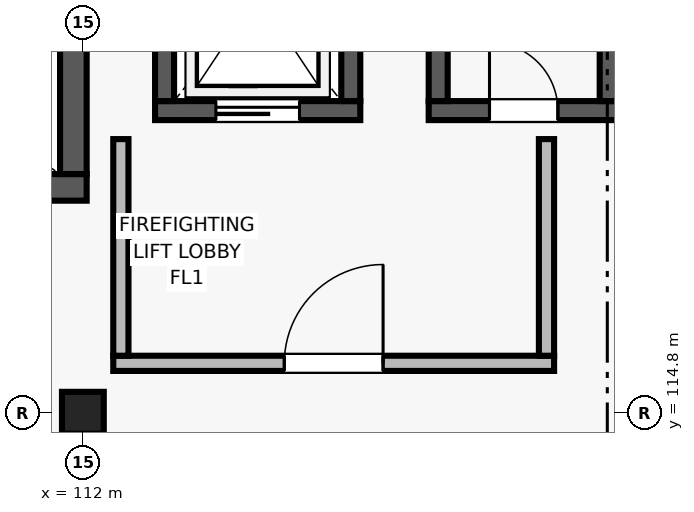
"""IFC4 building model, lengths in metres.
Left out: names, types, materials, properties, quantities, classifications, styles, units other than length and angle.
Written with IfcOpenShell. Run it as: python <this file> out.ifc"""

import sys

from ifc_helpers import new_model, si_unit, direction, frame, frame_2d, origin, origin_2d, place, context, subcontext, project, spatial, rectangle, extrude, element, fill, save


model = new_model("IFC4")
c1 = context("Model", 3, precision=1e-05, world=origin(), true_north=direction((0.0, 1.0)))
c2 = subcontext(c1, "Body", "Model", "MODEL_VIEW")
j1 = project(units=[si_unit("LENGTHUNIT", "METRE"), si_unit("PLANEANGLEUNIT", "RADIAN")], contexts=[c1])
p1 = place(None, origin())
s1 = spatial("IfcSite", under=j1, at=p1, CompositionType="ELEMENT")
p2 = place(p1, origin())
s2 = spatial("IfcBuilding", under=s1, at=p2, CompositionType="ELEMENT")
p3 = place(p2, frame((0.0, 0.0, 25.8)))
s3 = spatial("IfcBuildingStorey", under=s2, at=p3, CompositionType="ELEMENT", Elevation=25.8)
p4 = place(p3, frame((112.0, 114.8, 0.0), z_axis=(0.0, 0.0, 1.0), x_axis=(1.0, 0.0, 0.0)))
e1 = element("IfcColumn", 1, at=p4, inside=s3, PredefinedType="COLUMN", context=c2, shape_type="SweptSolid", body=[
    extrude(rectangle(XDim=0.55, YDim=0.55, at=origin_2d()), origin(), (0.0, 0.0, 1.0), 4.2),
])
p5 = place(p3, frame((103.95, 117.765, 0.0), z_axis=(0.0, 0.0, 1.0), x_axis=(1.0, 0.0, 0.0)))
e2 = element("IfcWall", 2, at=p5, inside=s3, PredefinedType="SHEAR", context=c2, shape_type="SweptSolid", body=[
    extrude(rectangle(XDim=8.1, YDim=0.35, at=frame_2d((4.05, 0.0))), origin(), (0.0, 0.0, 1.0), 3.92),
])
p6 = place(p5, frame((0.6, 0.0, 0.0)))
e3 = element("IfcOpeningElement", 3, at=p6, cuts=e2, PredefinedType="OPENING", context=c2, shape_type="SweptSolid", body=[
    extrude(rectangle(XDim=1.25, YDim=2.2, at=frame_2d((0.625, 1.1))), frame((0.0, 0.185, 0.0), z_axis=(0.0, -1.0, 0.0), x_axis=(1.0, 0.0, 0.0)), (0.0, 0.0, 1.0), 0.37),
])
p7 = place(p3, frame((111.875, 117.94, 0.0), z_axis=(0.0, 0.0, 1.0), x_axis=(0.0, 1.0, 0.0)))
e4 = element("IfcWall", 4, at=p7, inside=s3, PredefinedType="SHEAR", context=c2, shape_type="SweptSolid", body=[
    extrude(rectangle(XDim=3.76, YDim=0.35, at=frame_2d((1.88, 0.0))), origin(), (0.0, 0.0, 1.0), 3.92),
])
p8 = place(p3, frame((112.95, 118.775, 0.0), z_axis=(0.0, 0.0, 1.0), x_axis=(1.0, 0.0, 0.0)))
e5 = element("IfcWall", 5, at=p8, inside=s3, PredefinedType="SHEAR", context=c2, shape_type="SweptSolid", body=[
    extrude(rectangle(XDim=2.7, YDim=0.25, at=frame_2d((1.35, 0.0))), origin(), (0.0, 0.0, 1.0), 3.92),
])
p9 = place(p8, frame((0.8, 0.0, 0.0)))
e6 = element("IfcOpeningElement", 6, at=p9, cuts=e5, PredefinedType="OPENING", context=c2, shape_type="SweptSolid", body=[
    extrude(rectangle(XDim=1.1, YDim=2.15, at=frame_2d((0.55, 1.075))), frame((0.0, 0.135, 0.0), z_axis=(0.0, -1.0, 0.0), x_axis=(1.0, 0.0, 0.0)), (0.0, 0.0, 1.0), 0.27),
])
for number, where, z_axis, x_axis in (
    (7, (113.075, 118.9, 0.0), (0.0, 0.0, 1.0), (0.0, 1.0, 0.0)),
    (8, (115.525, 118.9, 0.0), (0.0, 0.0, 1.0), (0.0, 1.0, 0.0)),
):
    element("IfcWall", number, at=place(p3, frame(where, z_axis=z_axis, x_axis=x_axis)), inside=s3, PredefinedType="SHEAR", context=c2, shape_type="SweptSolid", body=[
        extrude(rectangle(XDim=2.8, YDim=0.25, at=frame_2d((1.4, 0.0))), origin(), (0.0, 0.0, 1.0), 3.92),
    ])
p10 = place(p3, frame((112.4, 115.45, 0.0), z_axis=(0.0, 0.0, 1.0), x_axis=(1.0, 0.0, 0.0)))
e9 = element("IfcWall", 9, at=p10, inside=s3, PredefinedType="SOLIDWALL", context=c2, shape_type="SweptSolid", body=[
    extrude(rectangle(XDim=5.8, YDim=0.2, at=frame_2d((2.9, 0.0))), origin(), (0.0, 0.0, 1.0), 3.92),
])
p11 = place(p10, frame((2.25, 0.0, 0.0)))
e10 = element("IfcOpeningElement", 10, at=p11, cuts=e9, PredefinedType="OPENING", context=c2, shape_type="SweptSolid", body=[
    extrude(rectangle(XDim=1.3, YDim=2.2, at=frame_2d((0.65, 1.1))), frame((0.0, 0.11, 0.0), z_axis=(0.0, -1.0, 0.0), x_axis=(1.0, 0.0, 0.0)), (0.0, 0.0, 1.0), 0.22),
])
for number, where, z_axis, x_axis in (
    (11, (112.5, 115.55, 0.0), (0.0, 0.0, 1.0), (0.0, 1.0, 0.0)),
    (12, (118.1, 115.55, 0.0), (0.0, 0.0, 1.0), (0.0, 1.0, 0.0)),
):
    element("IfcWall", number, at=place(p3, frame(where, z_axis=z_axis, x_axis=x_axis)), inside=s3, PredefinedType="SOLIDWALL", context=c2, shape_type="SweptSolid", body=[
        extrude(rectangle(XDim=2.85, YDim=0.2, at=frame_2d((1.425, 0.0))), origin(), (0.0, 0.0, 1.0), 3.92),
    ])
p12 = place(p3, frame((116.55, 118.775, 0.0), z_axis=(0.0, 0.0, 1.0), x_axis=(1.0, 0.0, 0.0)))
e13 = element("IfcWall", 13, at=p12, inside=s3, PredefinedType="SHEAR", context=c2, shape_type="SweptSolid", body=[
    extrude(rectangle(XDim=2.5, YDim=0.25, at=frame_2d((1.25, 0.0))), origin(), (0.0, 0.0, 1.0), 3.92),
])
p13 = place(p12, frame((0.8, 0.0, 0.0)))
e14 = element("IfcOpeningElement", 14, at=p13, cuts=e13, PredefinedType="OPENING", context=c2, shape_type="SweptSolid", body=[
    extrude(rectangle(XDim=0.9, YDim=2.05, at=frame_2d((0.45, 1.025))), frame((0.0, 0.135, 0.0), z_axis=(0.0, -1.0, 0.0), x_axis=(1.0, 0.0, 0.0)), (0.0, 0.0, 1.0), 0.27),
])
for number, where, z_axis, x_axis in (
    (15, (116.675, 118.9, 0.0), (0.0, 0.0, 1.0), (0.0, 1.0, 0.0)),
    (16, (118.925, 118.9, 0.0), (0.0, 0.0, 1.0), (0.0, 1.0, 0.0)),
):
    element("IfcWall", number, at=place(p3, frame(where, z_axis=z_axis, x_axis=x_axis)), inside=s3, PredefinedType="SHEAR", context=c2, shape_type="SweptSolid", body=[
        extrude(rectangle(XDim=2.8, YDim=0.25, at=frame_2d((1.4, 0.0))), origin(), (0.0, 0.0, 1.0), 3.92),
    ])
p14 = place(p11, origin())
e17 = element("IfcDoor", 17, at=p14, inside=s3, OperationType="SINGLE_SWING_RIGHT", PredefinedType="DOOR", context=c2, shape_type="SweptSolid", body=[
    extrude(rectangle(XDim=1.3, YDim=2.2, at=frame_2d((0.65, 1.1))), frame((0.0, 0.025, 0.0), z_axis=(0.0, -1.0, 0.0), x_axis=(1.0, 0.0, 0.0)), (0.0, 0.0, 1.0), 0.05),
])
fill(e10, e17)
p15 = place(p13, origin())
e18 = element("IfcDoor", 18, at=p15, inside=s3, OperationType="SINGLE_SWING_LEFT", PredefinedType="DOOR", context=c2, shape_type="SweptSolid", body=[
    extrude(rectangle(XDim=0.9, YDim=2.05, at=frame_2d((0.45, 1.025))), frame((0.0, 0.025, 0.0), z_axis=(0.0, -1.0, 0.0), x_axis=(1.0, 0.0, 0.0)), (0.0, 0.0, 1.0), 0.05),
])
fill(e14, e18)
p16 = place(p9, origin())
e19 = element("IfcDoor", 19, at=p16, inside=s3, OperationType="SLIDING_TO_LEFT", PredefinedType="DOOR", context=c2, shape_type="SweptSolid", body=[
    extrude(rectangle(XDim=1.1, YDim=2.15, at=frame_2d((0.55, 1.075))), frame((0.0, 0.025, 0.0), z_axis=(0.0, -1.0, 0.0), x_axis=(1.0, 0.0, 0.0)), (0.0, 0.0, 1.0), 0.05),
])
fill(e6, e19)
save(model, sys.argv[1])
